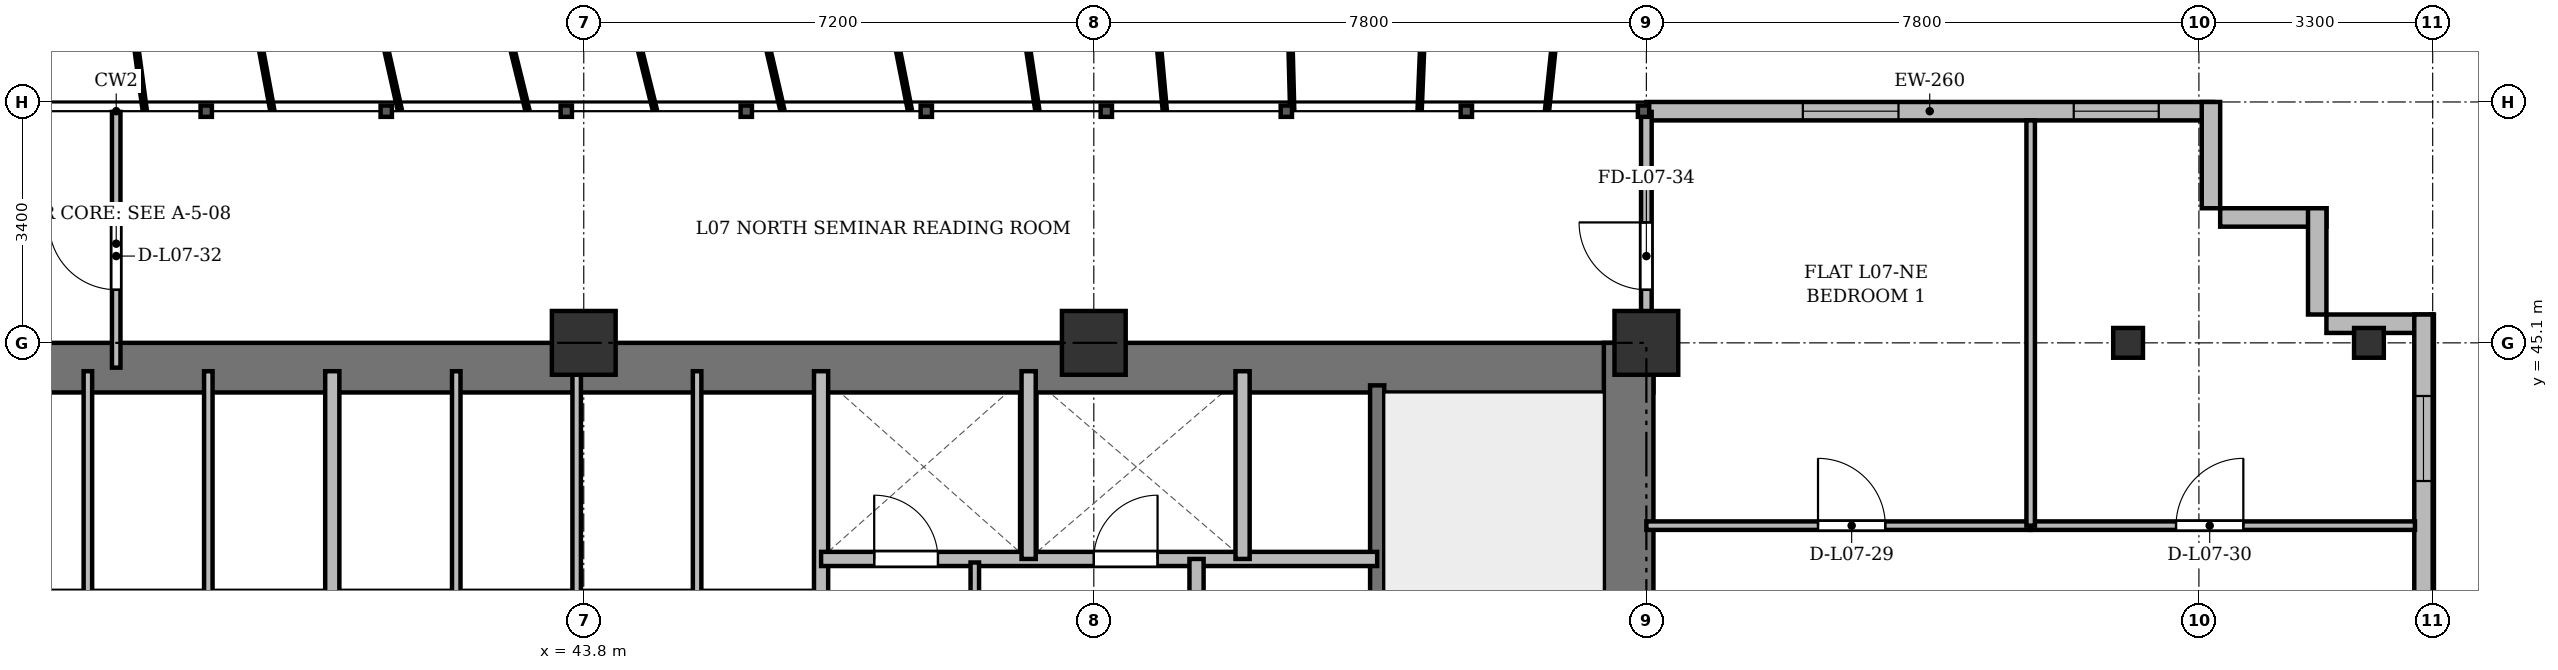
"""IFC4 building model, lengths in metres.
Left out: names, types, materials, properties, quantities, classifications, styles, units other than length and angle.
Written with IfcOpenShell. Run it as: python <this file> out.ifc"""

import sys

from ifc_helpers import new_model, si_unit, direction, frame, frame_2d, origin, origin_2d, place, context, subcontext, project, spatial, rectangle, i_section, extrude, source, transform, mapped, element, fill, save


model = new_model("IFC4")
c1 = context("Model", 3, precision=1e-05, world=origin(), true_north=direction((0.0, 1.0)))
c2 = subcontext(c1, "Body", "Model", "MODEL_VIEW")
j1 = project(units=[si_unit("LENGTHUNIT", "METRE"), si_unit("PLANEANGLEUNIT", "RADIAN")], contexts=[c1])
p1 = place(None, origin())
s1 = spatial("IfcSite", under=j1, at=p1, CompositionType="ELEMENT")
p2 = place(p1, origin())
s2 = spatial("IfcBuilding", under=s1, at=p2, CompositionType="ELEMENT")
p3 = place(p2, frame((0.0, 0.0, 30.7)))
s3 = spatial("IfcBuildingStorey", under=s2, at=p3, CompositionType="ELEMENT", Elevation=30.7)
m1 = source(origin(), c2, "Body", "SweptSolid", [
    extrude(rectangle(XDim=0.9, YDim=0.9, at=origin_2d()), origin(), (0.0, 0.0, 1.0), 3.6),
])
for number, where, z_axis, x_axis in (
    (1, (43.8, 45.1, 0.0), (0.0, 0.0, 1.0), (1.0, 0.0, 0.0)),
    (2, (51.0, 45.1, 0.0), (0.0, 0.0, 1.0), (1.0, 0.0, 0.0)),
    (3, (58.8, 45.1, 0.0), (0.0, 0.0, 1.0), (1.0, 0.0, 0.0)),
):
    element("IfcColumn", number, at=place(p3, frame(where, z_axis=z_axis, x_axis=x_axis)), inside=s3, PredefinedType="COLUMN", context=c2, shape_type="MappedRepresentation", body=[
        mapped(m1, transform((0.0, 0.0, 0.0), x_axis=(1.0, 0.0, 0.0), y_axis=(0.0, 1.0, 0.0), z_axis=(0.0, 0.0, 1.0), scale=1.0)),
    ])
m2 = source(origin(), c2, "Body", "SweptSolid", [
    extrude(i_section(OverallWidth=0.42, OverallDepth=0.42, WebThickness=0.026, FlangeThickness=0.04, at=origin_2d()), origin(), (0.0, 0.0, 1.0), 3.6),
])
for number, where, z_axis, x_axis in (
    (4, (65.6, 45.1, 0.0), (0.0, 0.0, 1.0), (1.0, 0.0, 0.0)),
    (5, (69.0, 45.1, 0.0), (0.0, 0.0, 1.0), (1.0, 0.0, 0.0)),
):
    element("IfcColumn", number, at=place(p3, frame(where, z_axis=z_axis, x_axis=x_axis)), inside=s3, PredefinedType="COLUMN", context=c2, shape_type="MappedRepresentation", body=[
        mapped(m2, transform((0.0, 0.0, 0.0), x_axis=(1.0, 0.0, 0.0), y_axis=(0.0, 1.0, 0.0), z_axis=(0.0, 0.0, 1.0), scale=1.0)),
    ])
p4 = place(p3, frame((58.8, 48.37, 0.0), z_axis=(0.0, 0.0, 1.0), x_axis=(1.0, 0.0, 0.0)))
e6 = element("IfcWall", 6, at=p4, inside=s3, PredefinedType="SOLIDWALL", context=c2, shape_type="SweptSolid", body=[
    extrude(rectangle(XDim=8.0, YDim=0.26, at=frame_2d((4.0, 0.0))), origin(), (0.0, 0.0, 1.0), 3.34),
])
p5 = place(p4, frame((2.209, 0.0, 0.9)))
e7 = element("IfcOpeningElement", 7, at=p5, cuts=e6, PredefinedType="OPENING", context=c2, shape_type="SweptSolid", body=[
    extrude(rectangle(XDim=1.35, YDim=1.5, at=frame_2d((0.675, 0.75))), frame((0.0, 0.14, 0.0), z_axis=(0.0, -1.0, 0.0), x_axis=(1.0, 0.0, 0.0)), (0.0, 0.0, 1.0), 0.28),
])
p6 = place(p4, frame((6.033, 0.0, 0.9)))
e8 = element("IfcOpeningElement", 8, at=p6, cuts=e6, PredefinedType="OPENING", context=c2, shape_type="SweptSolid", body=[
    extrude(rectangle(XDim=1.2, YDim=1.65, at=frame_2d((0.6, 0.825))), frame((0.0, 0.14, 0.0), z_axis=(0.0, -1.0, 0.0), x_axis=(1.0, 0.0, 0.0)), (0.0, 0.0, 1.0), 0.28),
])
for number, where, z_axis, x_axis in (
    (9, (66.77, 48.5, 0.0), (0.0, 0.0, 1.0), (0.0, -1.0, 0.0)),
    (10, (66.9, 46.87, 0.0), (0.0, 0.0, 1.0), (1.0, 0.0, 0.0)),
    (11, (68.27, 47.0, 0.0), (0.0, 0.0, 1.0), (0.0, -1.0, 0.0)),
):
    element("IfcWall", number, at=place(p3, frame(where, z_axis=z_axis, x_axis=x_axis)), inside=s3, PredefinedType="SOLIDWALL", context=c2, shape_type="SweptSolid", body=[
        extrude(rectangle(XDim=1.5, YDim=0.26, at=frame_2d((0.75, 0.0))), origin(), (0.0, 0.0, 1.0), 3.34),
    ])
p7 = place(p3, frame((68.4, 45.37, 0.0), z_axis=(0.0, 0.0, 1.0), x_axis=(1.0, 0.0, 0.0)))
e12 = element("IfcWall", 12, at=p7, inside=s3, PredefinedType="SOLIDWALL", context=c2, shape_type="SweptSolid", body=[
    extrude(rectangle(XDim=1.5, YDim=0.26, at=frame_2d((0.75, 0.0))), origin(), (0.0, 0.0, 1.0), 2.69),
])
p8 = place(p3, frame((69.77, 45.5, 0.0), z_axis=(0.0, 0.0, 1.0), x_axis=(0.0, -1.0, 0.0)))
e13 = element("IfcWall", 13, at=p8, inside=s3, PredefinedType="SOLIDWALL", context=c2, shape_type="SweptSolid", body=[
    extrude(rectangle(XDim=39.6, YDim=0.26, at=frame_2d((19.8, 0.0))), origin(), (0.0, 0.0, 1.0), 3.34),
])
p9 = place(p8, frame((36.95, 0.0, 0.92)))
e14 = element("IfcOpeningElement", 14, at=p9, cuts=e13, PredefinedType="OPENING", context=c2, shape_type="SweptSolid", body=[
    extrude(rectangle(XDim=1.2, YDim=1.65, at=frame_2d((0.6, 0.825))), frame((0.0, 0.14, 0.0), z_axis=(0.0, -1.0, 0.0), x_axis=(1.0, 0.0, 0.0)), (0.0, 0.0, 1.0), 0.28),
])
p10 = place(p8, frame((32.9, 0.0, 0.92)))
e15 = element("IfcOpeningElement", 15, at=p10, cuts=e13, PredefinedType="OPENING", context=c2, shape_type="SweptSolid", body=[
    extrude(rectangle(XDim=2.4, YDim=2.1, at=frame_2d((1.2, 1.05))), frame((0.0, 0.14, 0.0), z_axis=(0.0, -1.0, 0.0), x_axis=(1.0, 0.0, 0.0)), (0.0, 0.0, 1.0), 0.28),
])
p11 = place(p8, frame((28.7, 0.0, 0.92)))
e16 = element("IfcOpeningElement", 16, at=p11, cuts=e13, PredefinedType="OPENING", context=c2, shape_type="SweptSolid", body=[
    extrude(rectangle(XDim=2.4, YDim=2.1, at=frame_2d((1.2, 1.05))), frame((0.0, 0.14, 0.0), z_axis=(0.0, -1.0, 0.0), x_axis=(1.0, 0.0, 0.0)), (0.0, 0.0, 1.0), 0.28),
])
p12 = place(p8, frame((7.5, 0.0, 0.92)))
e17 = element("IfcOpeningElement", 17, at=p12, cuts=e13, PredefinedType="OPENING", context=c2, shape_type="SweptSolid", body=[
    extrude(rectangle(XDim=2.4, YDim=2.1, at=frame_2d((1.2, 1.05))), frame((0.0, 0.14, 0.0), z_axis=(0.0, -1.0, 0.0), x_axis=(1.0, 0.0, 0.0)), (0.0, 0.0, 1.0), 0.28),
])
p13 = place(p8, frame((4.5, 0.0, 0.92)))
e18 = element("IfcOpeningElement", 18, at=p13, cuts=e13, PredefinedType="OPENING", context=c2, shape_type="SweptSolid", body=[
    extrude(rectangle(XDim=1.2, YDim=1.65, at=frame_2d((0.6, 0.825))), frame((0.0, 0.14, 0.0), z_axis=(0.0, -1.0, 0.0), x_axis=(1.0, 0.0, 0.0)), (0.0, 0.0, 1.0), 0.28),
])
p14 = place(p8, frame((1.15, 0.0, 0.92)))
e19 = element("IfcOpeningElement", 19, at=p14, cuts=e13, PredefinedType="OPENING", context=c2, shape_type="SweptSolid", body=[
    extrude(rectangle(XDim=1.2, YDim=1.65, at=frame_2d((0.6, 0.825))), frame((0.0, 0.14, 0.0), z_axis=(0.0, -1.0, 0.0), x_axis=(1.0, 0.0, 0.0)), (0.0, 0.0, 1.0), 0.28),
])
p15 = place(p3, frame((15.5, 44.75, 0.0), z_axis=(0.0, 0.0, 1.0), x_axis=(1.0, 0.0, 0.0)))
e20 = element("IfcWall", 20, at=p15, inside=s3, PredefinedType="SHEAR", context=c2, shape_type="SweptSolid", body=[
    extrude(rectangle(XDim=43.4, YDim=0.7, at=frame_2d((21.7, 0.0))), origin(), (0.0, 0.0, 1.0), 3.34),
])
p16 = place(p3, frame((58.55, 33.4, 0.0), z_axis=(0.0, 0.0, 1.0), x_axis=(0.0, 1.0, 0.0)))
e21 = element("IfcWall", 21, at=p16, inside=s3, PredefinedType="SHEAR", context=c2, shape_type="SweptSolid", body=[
    extrude(rectangle(XDim=11.7, YDim=0.7, at=frame_2d((5.85, 0.0))), origin(), (0.0, 0.0, 1.0), 3.34),
])
p17 = place(p3, frame((55.0, 33.4, 0.0), z_axis=(0.0, 0.0, 1.0), x_axis=(0.0, 1.0, 0.0)))
e22 = element("IfcWall", 22, at=p17, inside=s3, PredefinedType="SHEAR", context=c2, shape_type="SweptSolid", body=[
    extrude(rectangle(XDim=11.1, YDim=0.2, at=frame_2d((5.55, 0.0))), origin(), (0.0, 0.0, 1.0), 3.34),
])
p18 = place(p17, frame((0.85, 0.0, 0.0)))
e23 = element("IfcOpeningElement", 23, at=p18, cuts=e22, PredefinedType="OPENING", context=c2, shape_type="SweptSolid", body=[
    extrude(rectangle(XDim=1.1, YDim=2.15, at=frame_2d((0.55, 1.075))), frame((0.0, 0.11, 0.0), z_axis=(0.0, -1.0, 0.0), x_axis=(1.0, 0.0, 0.0)), (0.0, 0.0, 1.0), 0.22),
])
for number, where, z_axis, x_axis in (
    (24, (36.8, 41.5, 0.0), (0.0, 0.0, 1.0), (0.0, 1.0, 0.0)),
    (25, (38.5, 41.5, 0.0), (0.0, 0.0, 1.0), (0.0, 1.0, 0.0)),
):
    element("IfcWall", number, at=place(p3, frame(where, z_axis=z_axis, x_axis=x_axis)), inside=s3, PredefinedType="PARTITIONING", context=c2, shape_type="SweptSolid", body=[
        extrude(rectangle(XDim=3.2, YDim=0.12, at=frame_2d((1.6, 0.0))), origin(), (0.0, 0.0, 1.0), 3.34),
    ])
p19 = place(p3, frame((40.25, 41.5, 0.0), z_axis=(0.0, 0.0, 1.0), x_axis=(0.0, 1.0, 0.0)))
e26 = element("IfcWall", 26, at=p19, inside=s3, PredefinedType="SOLIDWALL", context=c2, shape_type="SweptSolid", body=[
    extrude(rectangle(XDim=3.2, YDim=0.2, at=frame_2d((1.6, 0.0))), origin(), (0.0, 0.0, 1.0), 3.34),
])
p20 = place(p3, frame((42.0, 41.5, 0.0), z_axis=(0.0, 0.0, 1.0), x_axis=(0.0, 1.0, 0.0)))
e27 = element("IfcWall", 27, at=p20, inside=s3, PredefinedType="PARTITIONING", context=c2, shape_type="SweptSolid", body=[
    extrude(rectangle(XDim=3.2, YDim=0.12, at=frame_2d((1.6, 0.0))), origin(), (0.0, 0.0, 1.0), 3.34),
])
p21 = place(p3, frame((43.7, 41.5, 0.0), z_axis=(0.0, 0.0, 1.0), x_axis=(0.0, 1.0, 0.0)))
e28 = element("IfcWall", 28, at=p21, inside=s3, PredefinedType="PARTITIONING", context=c2, shape_type="SweptSolid", body=[
    extrude(rectangle(XDim=3.2, YDim=0.12, at=frame_2d((1.6, 0.0))), origin(), (0.0, 0.0, 1.0), 2.752),
])
p22 = place(p3, frame((45.4, 41.5, 0.0), z_axis=(0.0, 0.0, 1.0), x_axis=(0.0, 1.0, 0.0)))
e29 = element("IfcWall", 29, at=p22, inside=s3, PredefinedType="PARTITIONING", context=c2, shape_type="SweptSolid", body=[
    extrude(rectangle(XDim=3.2, YDim=0.12, at=frame_2d((1.6, 0.0))), origin(), (0.0, 0.0, 1.0), 3.34),
])
p23 = place(p3, frame((47.15, 33.4, 0.0), z_axis=(0.0, 0.0, 1.0), x_axis=(0.0, 1.0, 0.0)))
e30 = element("IfcWall", 30, at=p23, inside=s3, PredefinedType="SOLIDWALL", context=c2, shape_type="SweptSolid", body=[
    extrude(rectangle(XDim=11.3, YDim=0.2, at=frame_2d((5.65, 0.0))), origin(), (0.0, 0.0, 1.0), 2.69),
])
p24 = place(p3, frame((47.15, 42.05, 0.0), z_axis=(0.0, 0.0, 1.0), x_axis=(1.0, 0.0, 0.0)))
e31 = element("IfcWall", 31, at=p24, inside=s3, PredefinedType="SOLIDWALL", context=c2, shape_type="SweptSolid", body=[
    extrude(rectangle(XDim=7.85, YDim=0.2, at=frame_2d((3.925, 0.0))), origin(), (0.0, 0.0, 1.0), 2.752),
])
p25 = place(p24, frame((0.75, 0.0, 0.0)))
e32 = element("IfcOpeningElement", 32, at=p25, cuts=e31, PredefinedType="OPENING", context=c2, shape_type="SweptSolid", body=[
    extrude(rectangle(XDim=0.9, YDim=2.1, at=frame_2d((0.45, 1.05))), frame((0.0, 0.11, 0.0), z_axis=(0.0, -1.0, 0.0), x_axis=(1.0, 0.0, 0.0)), (0.0, 0.0, 1.0), 0.22),
])
p26 = place(p24, frame((3.85, 0.0, 0.0)))
e33 = element("IfcOpeningElement", 33, at=p26, cuts=e31, PredefinedType="OPENING", context=c2, shape_type="SweptSolid", body=[
    extrude(rectangle(XDim=0.9, YDim=2.1, at=frame_2d((0.45, 1.05))), frame((0.0, 0.11, 0.0), z_axis=(0.0, -1.0, 0.0), x_axis=(1.0, 0.0, 0.0)), (0.0, 0.0, 1.0), 0.22),
])
for number, where, z_axis, x_axis in (
    (34, (50.08, 42.05, 0.0), (0.0, 0.0, 1.0), (0.0, 1.0, 0.0)),
    (35, (53.1, 42.05, 0.0), (0.0, 0.0, 1.0), (0.0, 1.0, 0.0)),
):
    element("IfcWall", number, at=place(p3, frame(where, z_axis=z_axis, x_axis=x_axis)), inside=s3, PredefinedType="SOLIDWALL", context=c2, shape_type="SweptSolid", body=[
        extrude(rectangle(XDim=2.65, YDim=0.2, at=frame_2d((1.325, 0.0))), origin(), (0.0, 0.0, 1.0), 3.34),
    ])
p27 = place(p3, frame((52.45, 33.4, 0.0), z_axis=(0.0, 0.0, 1.0), x_axis=(0.0, 1.0, 0.0)))
e36 = element("IfcWall", 36, at=p27, inside=s3, PredefinedType="PARTITIONING", context=c2, shape_type="SweptSolid", body=[
    extrude(rectangle(XDim=8.65, YDim=0.2, at=frame_2d((4.325, 0.0))), origin(), (0.0, 0.0, 1.0), 2.69),
])
p28 = place(p27, frame((6.2, 0.0, 0.0)))
e37 = element("IfcOpeningElement", 37, at=p28, cuts=e36, PredefinedType="OPENING", context=c2, shape_type="SweptSolid", body=[
    extrude(rectangle(XDim=0.95, YDim=2.15, at=frame_2d((0.475, 1.075))), frame((0.0, 0.11, 0.0), z_axis=(0.0, -1.0, 0.0), x_axis=(1.0, 0.0, 0.0)), (0.0, 0.0, 1.0), 0.22),
])
p29 = place(p3, frame((49.32, 33.4, 0.0), z_axis=(0.0, 0.0, 1.0), x_axis=(0.0, 1.0, 0.0)))
e38 = element("IfcWall", 38, at=p29, inside=s3, PredefinedType="PARTITIONING", context=c2, shape_type="SweptSolid", body=[
    extrude(rectangle(XDim=8.6, YDim=0.12, at=frame_2d((4.3, 0.0))), origin(), (0.0, 0.0, 1.0), 2.69),
])
p30 = place(p29, frame((0.85, 0.0, 0.0)))
e39 = element("IfcOpeningElement", 39, at=p30, cuts=e38, PredefinedType="OPENING", context=c2, shape_type="SweptSolid", body=[
    extrude(rectangle(XDim=0.95, YDim=2.15, at=frame_2d((0.475, 1.075))), frame((0.0, 0.07, 0.0), z_axis=(0.0, -1.0, 0.0), x_axis=(1.0, 0.0, 0.0)), (0.0, 0.0, 1.0), 0.14),
])
p31 = place(p29, frame((3.55, 0.0, 0.0)))
e40 = element("IfcOpeningElement", 40, at=p31, cuts=e38, PredefinedType="OPENING", context=c2, shape_type="SweptSolid", body=[
    extrude(rectangle(XDim=0.95, YDim=2.15, at=frame_2d((0.475, 1.075))), frame((0.0, 0.07, 0.0), z_axis=(0.0, -1.0, 0.0), x_axis=(1.0, 0.0, 0.0)), (0.0, 0.0, 1.0), 0.14),
])
p32 = place(p29, frame((6.3, 0.0, 0.0)))
e41 = element("IfcOpeningElement", 41, at=p32, cuts=e38, PredefinedType="OPENING", context=c2, shape_type="SweptSolid", body=[
    extrude(rectangle(XDim=0.95, YDim=2.15, at=frame_2d((0.475, 1.075))), frame((0.0, 0.07, 0.0), z_axis=(0.0, -1.0, 0.0), x_axis=(1.0, 0.0, 0.0)), (0.0, 0.0, 1.0), 0.14),
])
p33 = place(p3, frame((58.8, 42.52, 0.0), z_axis=(0.0, 0.0, 1.0), x_axis=(1.0, 0.0, 0.0)))
e42 = element("IfcWall", 42, at=p33, inside=s3, PredefinedType="PARTITIONING", context=c2, shape_type="SweptSolid", body=[
    extrude(rectangle(XDim=5.425, YDim=0.12, at=frame_2d((2.712, 0.0))), origin(), (0.0, 0.0, 1.0), 2.752),
])
p34 = place(p33, frame((2.423, 0.0, 0.0)))
e43 = element("IfcOpeningElement", 43, at=p34, cuts=e42, PredefinedType="OPENING", context=c2, shape_type="SweptSolid", body=[
    extrude(rectangle(XDim=0.95, YDim=2.15, at=frame_2d((0.475, 1.075))), frame((0.0, 0.07, 0.0), z_axis=(0.0, -1.0, 0.0), x_axis=(1.0, 0.0, 0.0)), (0.0, 0.0, 1.0), 0.14),
])
p35 = place(p3, frame((64.225, 42.52, 0.0), z_axis=(0.0, 0.0, 1.0), x_axis=(1.0, 0.0, 0.0)))
e44 = element("IfcWall", 44, at=p35, inside=s3, PredefinedType="PARTITIONING", context=c2, shape_type="SweptSolid", body=[
    extrude(rectangle(XDim=5.425, YDim=0.12, at=frame_2d((2.712, 0.0))), origin(), (0.0, 0.0, 1.0), 2.752),
])
p36 = place(p35, frame((2.052, 0.0, 0.0)))
e45 = element("IfcOpeningElement", 45, at=p36, cuts=e44, PredefinedType="OPENING", context=c2, shape_type="SweptSolid", body=[
    extrude(rectangle(XDim=0.95, YDim=2.15, at=frame_2d((0.475, 1.075))), frame((0.0, 0.07, 0.0), z_axis=(0.0, -1.0, 0.0), x_axis=(1.0, 0.0, 0.0)), (0.0, 0.0, 1.0), 0.14),
])
p37 = place(p3, frame((64.225, 42.52, 0.0), z_axis=(0.0, 0.0, 1.0), x_axis=(0.0, 1.0, 0.0)))
e46 = element("IfcWall", 46, at=p37, inside=s3, PredefinedType="PARTITIONING", context=c2, shape_type="SweptSolid", body=[
    extrude(rectangle(XDim=5.72, YDim=0.12, at=frame_2d((2.86, 0.0))), origin(), (0.0, 0.0, 1.0), 2.69),
])
p38 = place(p3, frame((37.2, 44.75, 0.0), z_axis=(0.0, 0.0, 1.0), x_axis=(0.0, 1.0, 0.0)))
e47 = element("IfcWall", 47, at=p38, inside=s3, PredefinedType="PARTITIONING", context=c2, shape_type="SweptSolid", body=[
    extrude(rectangle(XDim=3.61, YDim=0.12, at=frame_2d((1.805, 0.0))), origin(), (0.0, 0.0, 1.0), 2.69),
])
p39 = place(p38, frame((1.1, 0.0, 0.0)))
e48 = element("IfcOpeningElement", 48, at=p39, cuts=e47, PredefinedType="OPENING", context=c2, shape_type="SweptSolid", body=[
    extrude(rectangle(XDim=0.95, YDim=2.15, at=frame_2d((0.475, 1.075))), frame((0.0, 0.07, 0.0), z_axis=(0.0, -1.0, 0.0), x_axis=(1.0, 0.0, 0.0)), (0.0, 0.0, 1.0), 0.14),
])
p40 = place(p3, frame((58.8, 44.75, 0.0), z_axis=(0.0, 0.0, 1.0), x_axis=(0.0, 1.0, 0.0)))
e49 = element("IfcWall", 49, at=p40, inside=s3, PredefinedType="PARTITIONING", context=c2, shape_type="SweptSolid", body=[
    extrude(rectangle(XDim=3.61, YDim=0.15, at=frame_2d((1.805, 0.0))), origin(), (0.0, 0.0, 1.0), 2.752),
])
p41 = place(p40, frame((1.1, 0.0, 0.0)))
e50 = element("IfcOpeningElement", 50, at=p41, cuts=e49, PredefinedType="OPENING", context=c2, shape_type="SweptSolid", body=[
    extrude(rectangle(XDim=0.95, YDim=2.15, at=frame_2d((0.475, 1.075))), frame((0.0, 0.085, 0.0), z_axis=(0.0, -1.0, 0.0), x_axis=(1.0, 0.0, 0.0)), (0.0, 0.0, 1.0), 0.17),
])
m3 = source(origin(), c2, "Body", "SweptSolid", [
    extrude(rectangle(XDim=1.35, YDim=1.5, at=frame_2d((0.675, 0.75))), frame((0.0, 0.03, 0.0), z_axis=(0.0, -1.0, 0.0), x_axis=(1.0, 0.0, 0.0)), (0.0, 0.0, 1.0), 0.06),
])
p42 = place(p5, origin())
e51 = element("IfcWindow", 51, at=p42, inside=s3, PartitioningType="SINGLE_PANEL", PredefinedType="WINDOW", context=c2, shape_type="MappedRepresentation", body=[
    mapped(m3, transform((0.0, 0.0, 0.0), x_axis=(1.0, 0.0, 0.0), y_axis=(0.0, 1.0, 0.0), z_axis=(0.0, 0.0, 1.0), scale=1.0)),
])
fill(e7, e51)
m4 = source(origin(), c2, "Body", "SweptSolid", [
    extrude(rectangle(XDim=1.2, YDim=1.65, at=frame_2d((0.6, 0.825))), frame((0.0, 0.03, 0.0), z_axis=(0.0, -1.0, 0.0), x_axis=(1.0, 0.0, 0.0)), (0.0, 0.0, 1.0), 0.06),
])
p43 = place(p6, origin())
e52 = element("IfcWindow", 52, at=p43, inside=s3, PartitioningType="SINGLE_PANEL", PredefinedType="WINDOW", context=c2, shape_type="MappedRepresentation", body=[
    mapped(m4, transform((0.0, 0.0, 0.0), x_axis=(1.0, 0.0, 0.0), y_axis=(0.0, 1.0, 0.0), z_axis=(0.0, 0.0, 1.0), scale=1.0)),
])
fill(e8, e52)
p44 = place(p14, origin())
e53 = element("IfcWindow", 53, at=p44, inside=s3, PartitioningType="SINGLE_PANEL", PredefinedType="WINDOW", context=c2, shape_type="MappedRepresentation", body=[
    mapped(m4, transform((0.0, 0.0, 0.0), x_axis=(1.0, 0.0, 0.0), y_axis=(0.0, 1.0, 0.0), z_axis=(0.0, 0.0, 1.0), scale=1.0)),
])
fill(e19, e53)
m5 = source(origin(), c2, "Body", "SweptSolid", [
    extrude(rectangle(XDim=0.9, YDim=2.1, at=frame_2d((0.45, 1.05))), frame((0.0, 0.025, 0.0), z_axis=(0.0, -1.0, 0.0), x_axis=(1.0, 0.0, 0.0)), (0.0, 0.0, 1.0), 0.05),
])
p45 = place(p25, origin())
e54 = element("IfcDoor", 54, at=p45, inside=s3, OperationType="SINGLE_SWING_LEFT", PredefinedType="DOOR", context=c2, shape_type="MappedRepresentation", body=[
    mapped(m5, transform((0.0, 0.0, 0.0), x_axis=(1.0, 0.0, 0.0), y_axis=(0.0, 1.0, 0.0), z_axis=(0.0, 0.0, 1.0), scale=1.0)),
])
fill(e32, e54)
p46 = place(p26, origin())
e55 = element("IfcDoor", 55, at=p46, inside=s3, OperationType="SINGLE_SWING_RIGHT", PredefinedType="DOOR", context=c2, shape_type="MappedRepresentation", body=[
    mapped(m5, transform((0.0, 0.0, 0.0), x_axis=(1.0, 0.0, 0.0), y_axis=(0.0, 1.0, 0.0), z_axis=(0.0, 0.0, 1.0), scale=1.0)),
])
fill(e33, e55)
m6 = source(origin(), c2, "Body", "SweptSolid", [
    extrude(rectangle(XDim=0.95, YDim=2.15, at=frame_2d((0.475, 1.075))), frame((0.0, 0.025, 0.0), z_axis=(0.0, -1.0, 0.0), x_axis=(1.0, 0.0, 0.0)), (0.0, 0.0, 1.0), 0.05),
])
p47 = place(p34, origin())
e56 = element("IfcDoor", 56, at=p47, inside=s3, OperationType="SINGLE_SWING_LEFT", PredefinedType="DOOR", context=c2, shape_type="MappedRepresentation", body=[
    mapped(m6, transform((0.0, 0.0, 0.0), x_axis=(1.0, 0.0, 0.0), y_axis=(0.0, 1.0, 0.0), z_axis=(0.0, 0.0, 1.0), scale=1.0)),
])
fill(e43, e56)
p48 = place(p36, origin())
e57 = element("IfcDoor", 57, at=p48, inside=s3, OperationType="SINGLE_SWING_RIGHT", PredefinedType="DOOR", context=c2, shape_type="MappedRepresentation", body=[
    mapped(m6, transform((0.0, 0.0, 0.0), x_axis=(1.0, 0.0, 0.0), y_axis=(0.0, 1.0, 0.0), z_axis=(0.0, 0.0, 1.0), scale=1.0)),
])
fill(e45, e57)
p49 = place(p39, origin())
e58 = element("IfcDoor", 58, at=p49, inside=s3, OperationType="SINGLE_SWING_RIGHT", PredefinedType="DOOR", context=c2, shape_type="MappedRepresentation", body=[
    mapped(m6, transform((0.0, 0.0, 0.0), x_axis=(1.0, 0.0, 0.0), y_axis=(0.0, 1.0, 0.0), z_axis=(0.0, 0.0, 1.0), scale=1.0)),
])
fill(e48, e58)
p50 = place(p41, origin())
e59 = element("IfcDoor", 59, at=p50, inside=s3, OperationType="SINGLE_SWING_RIGHT", PredefinedType="DOOR", context=c2, shape_type="MappedRepresentation", body=[
    mapped(m6, transform((0.0, 0.0, 0.0), x_axis=(1.0, 0.0, 0.0), y_axis=(0.0, 1.0, 0.0), z_axis=(0.0, 0.0, 1.0), scale=1.0)),
])
fill(e50, e59)
save(model, sys.argv[1])
